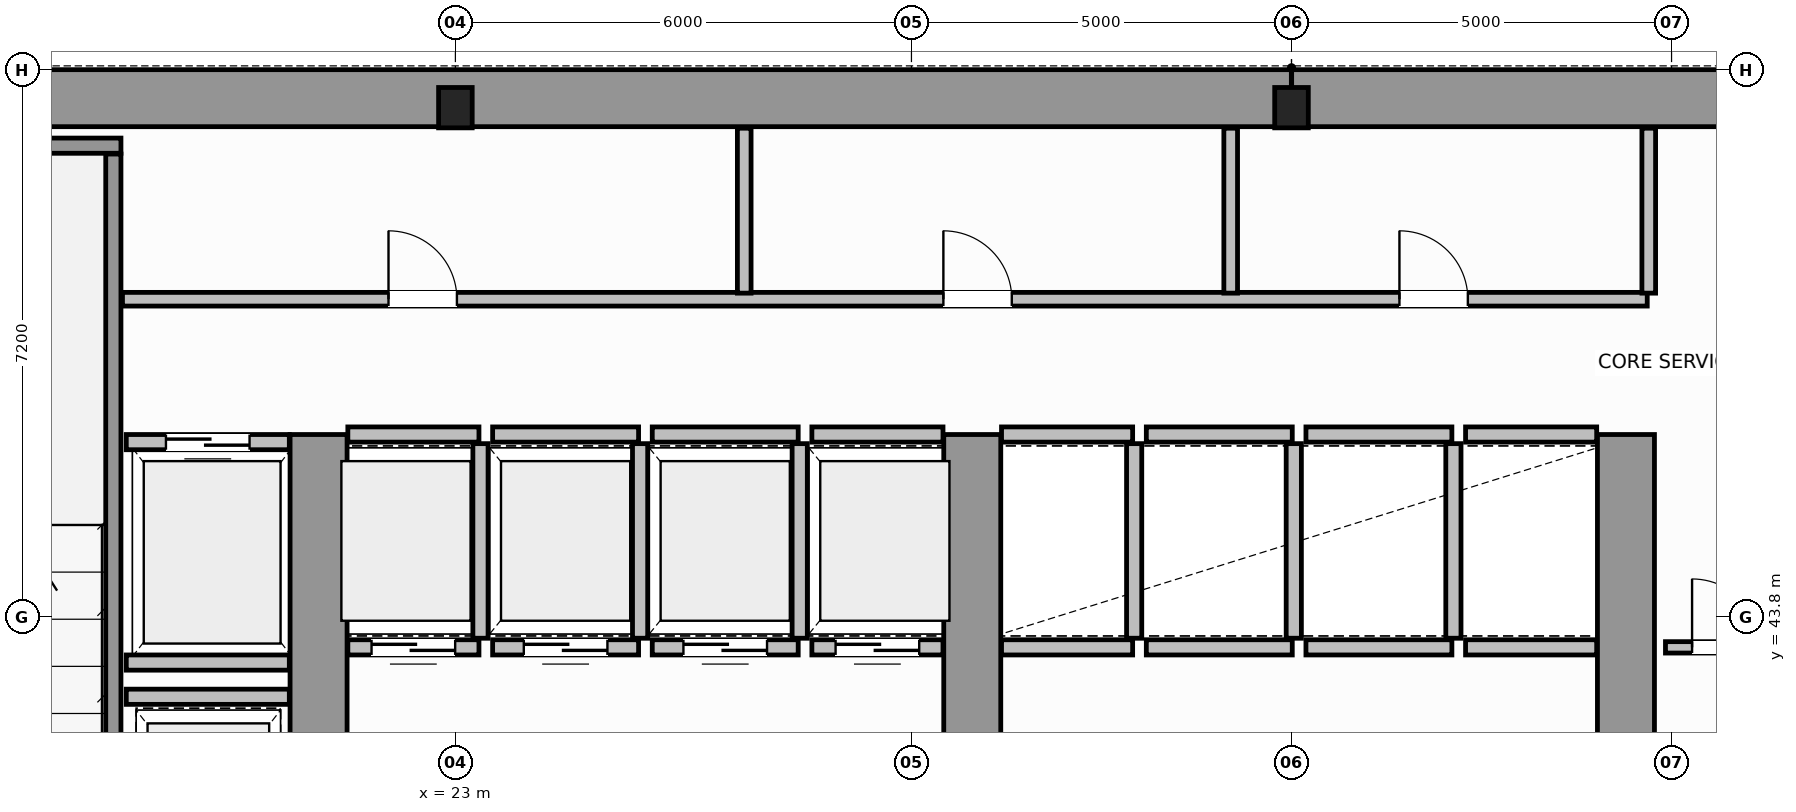
"""IFC4 building model, lengths in metres.
Left out: names, types, materials, properties, quantities, classifications, styles, units other than length and angle.
Written with IfcOpenShell. Run it as: python <this file> out.ifc"""

import sys

from ifc_helpers import new_model, si_unit, direction, frame, frame_2d, origin, origin_2d, place, context, subcontext, project, spatial, rectangle, i_section, extrude, source, transform, mapped, element, fill, save


model = new_model("IFC4")
c1 = context("Model", 3, precision=1e-05, world=origin(), true_north=direction((0.0, 1.0)))
c2 = subcontext(c1, "Body", "Model", "MODEL_VIEW")
j1 = project(units=[si_unit("LENGTHUNIT", "METRE"), si_unit("PLANEANGLEUNIT", "RADIAN")], contexts=[c1])
p1 = place(None, origin())
s1 = spatial("IfcSite", under=j1, at=p1, CompositionType="ELEMENT")
p2 = place(p1, origin())
s2 = spatial("IfcBuilding", under=s1, at=p2, CompositionType="ELEMENT")
p3 = place(p2, frame((0.0, 0.0, 88.2)))
s3 = spatial("IfcBuildingStorey", under=s2, at=p3, CompositionType="ELEMENT", Elevation=88.2)
m1 = source(origin(), c2, "Body", "SweptSolid", [
    extrude(i_section(OverallWidth=0.442, OverallDepth=0.531, WebThickness=0.065, FlangeThickness=0.076, FilletRadius=0.015, at=origin_2d()), origin(), (0.0, 0.0, 1.0), 3.8),
])
for number, where, z_axis, x_axis in (
    (1, (23.0, 50.5, 0.0), (0.0, 0.0, 1.0), (1.0, 0.0, 0.0)),
    (2, (34.0, 50.5, 0.0), (0.0, 0.0, 1.0), (1.0, 0.0, 0.0)),
):
    element("IfcColumn", number, at=place(p3, frame(where, z_axis=z_axis, x_axis=x_axis)), inside=s3, PredefinedType="COLUMN", context=c2, shape_type="MappedRepresentation", body=[
        mapped(m1, transform((0.0, 0.0, 0.0), scale=1.0)),
    ])
for number, where, z_axis, x_axis in (
    (3, (14.379, 50.625, 0.0), (0.0, 0.0, 1.0), (1.0, 0.0, 0.0)),
    (4, (34.002, 50.625, 0.0), (0.0, 0.0, 1.0), (1.0, 0.0, 0.0)),
):
    element("IfcWall", number, at=place(p3, frame(where, z_axis=z_axis, x_axis=x_axis)), inside=s3, PredefinedType="SHEAR", context=c2, shape_type="SweptSolid", body=[
        extrude(rectangle(XDim=19.619, YDim=0.75, at=frame_2d((9.81, 0.0))), origin(), (0.0, 0.0, 1.0), 3.8),
    ])
for number, where, z_axis, x_axis in (
    (5, (21.2, 36.895, 0.0), (0.0, 0.0, 1.0), (0.0, 1.0, 0.0)),
    (6, (29.8, 36.895, 0.0), (0.0, 0.0, 1.0), (0.0, 1.0, 0.0)),
    (7, (38.4, 36.895, 0.0), (0.0, 0.0, 1.0), (0.0, 1.0, 0.0)),
):
    element("IfcWall", number, at=place(p3, frame(where, z_axis=z_axis, x_axis=x_axis)), inside=s3, PredefinedType="SHEAR", context=c2, shape_type="SweptSolid", body=[
        extrude(rectangle(XDim=9.305, YDim=0.75, at=frame_2d((4.652, 0.0))), origin(), (0.0, 0.0, 1.0), 3.8),
    ])
p4 = place(p3, frame((14.375, 50.0, 0.0), z_axis=(0.0, 0.0, 1.0), x_axis=(1.0, 0.0, 0.0)))
e8 = element("IfcWall", 8, at=p4, inside=s3, PredefinedType="SOLIDWALL", context=c2, shape_type="SweptSolid", body=[
    extrude(rectangle(XDim=4.225, YDim=0.2, at=frame_2d((2.113, 0.0))), origin(), (0.0, 0.0, 1.0), 3.8),
])
p5 = place(p3, frame((18.5, 39.96, 0.0), z_axis=(0.0, 0.0, 1.0), x_axis=(0.0, 1.0, 0.0)))
e9 = element("IfcWall", 9, at=p5, inside=s3, PredefinedType="SOLIDWALL", context=c2, shape_type="SweptSolid", body=[
    extrude(rectangle(XDim=9.93, YDim=0.2, at=frame_2d((4.965, 0.0))), origin(), (0.0, 0.0, 1.0), 3.8),
])
p6 = place(p3, frame((21.585, 43.4, 0.0), z_axis=(0.0, 0.0, 1.0), x_axis=(1.0, 0.0, 0.0)))
e10 = element("IfcWall", 10, at=p6, inside=s3, PredefinedType="SOLIDWALL", context=c2, shape_type="SweptSolid", body=[
    extrude(rectangle(XDim=1.725, YDim=0.2, at=frame_2d((0.863, 0.0))), origin(), (0.0, 0.0, 1.0), 3.58),
])
p7 = place(p6, frame((0.312, 0.0, 0.0)))
e11 = element("IfcOpeningElement", 11, at=p7, cuts=e10, PredefinedType="OPENING", context=c2, shape_type="SweptSolid", body=[
    extrude(rectangle(XDim=1.1, YDim=2.15, at=frame_2d((0.55, 1.075))), frame((0.0, 0.11, 0.0), z_axis=(0.0, -1.0, 0.0), x_axis=(1.0, 0.0, 0.0)), (0.0, 0.0, 1.0), 0.22),
])
p8 = place(p3, frame((21.585, 46.2, 0.0), z_axis=(0.0, 0.0, 1.0), x_axis=(1.0, 0.0, 0.0)))
e12 = element("IfcWall", 12, at=p8, inside=s3, PredefinedType="SOLIDWALL", context=c2, shape_type="SweptSolid", body=[
    extrude(rectangle(XDim=1.725, YDim=0.2, at=frame_2d((0.863, 0.0))), origin(), (0.0, 0.0, 1.0), 3.58),
])
p9 = place(p3, frame((23.33, 43.52, 0.0), z_axis=(0.0, 0.0, 1.0), x_axis=(0.0, 1.0, 0.0)))
e13 = element("IfcWall", 13, at=p9, inside=s3, PredefinedType="SOLIDWALL", context=c2, shape_type="SweptSolid", body=[
    extrude(rectangle(XDim=2.56, YDim=0.2, at=frame_2d((1.28, 0.0))), origin(), (0.0, 0.0, 1.0), 3.58),
])
p10 = place(p3, frame((23.49, 43.4, 0.0), z_axis=(0.0, 0.0, 1.0), x_axis=(1.0, 0.0, 0.0)))
e14 = element("IfcWall", 14, at=p10, inside=s3, PredefinedType="SOLIDWALL", context=c2, shape_type="SweptSolid", body=[
    extrude(rectangle(XDim=1.92, YDim=0.2, at=frame_2d((0.96, 0.0))), origin(), (0.0, 0.0, 1.0), 3.58),
])
p11 = place(p10, frame((0.41, 0.0, 0.0)))
e15 = element("IfcOpeningElement", 15, at=p11, cuts=e14, PredefinedType="OPENING", context=c2, shape_type="SweptSolid", body=[
    extrude(rectangle(XDim=1.1, YDim=2.15, at=frame_2d((0.55, 1.075))), frame((0.0, 0.11, 0.0), z_axis=(0.0, -1.0, 0.0), x_axis=(1.0, 0.0, 0.0)), (0.0, 0.0, 1.0), 0.22),
])
p12 = place(p3, frame((23.49, 46.2, 0.0), z_axis=(0.0, 0.0, 1.0), x_axis=(1.0, 0.0, 0.0)))
e16 = element("IfcWall", 16, at=p12, inside=s3, PredefinedType="SOLIDWALL", context=c2, shape_type="SweptSolid", body=[
    extrude(rectangle(XDim=1.92, YDim=0.2, at=frame_2d((0.96, 0.0))), origin(), (0.0, 0.0, 1.0), 3.58),
])
p13 = place(p3, frame((25.43, 43.52, 0.0), z_axis=(0.0, 0.0, 1.0), x_axis=(0.0, 1.0, 0.0)))
e17 = element("IfcWall", 17, at=p13, inside=s3, PredefinedType="SOLIDWALL", context=c2, shape_type="SweptSolid", body=[
    extrude(rectangle(XDim=2.56, YDim=0.2, at=frame_2d((1.28, 0.0))), origin(), (0.0, 0.0, 1.0), 3.58),
])
p14 = place(p3, frame((25.59, 43.4, 0.0), z_axis=(0.0, 0.0, 1.0), x_axis=(1.0, 0.0, 0.0)))
e18 = element("IfcWall", 18, at=p14, inside=s3, PredefinedType="SOLIDWALL", context=c2, shape_type="SweptSolid", body=[
    extrude(rectangle(XDim=1.92, YDim=0.2, at=frame_2d((0.96, 0.0))), origin(), (0.0, 0.0, 1.0), 3.58),
])
p15 = place(p14, frame((0.41, 0.0, 0.0)))
e19 = element("IfcOpeningElement", 19, at=p15, cuts=e18, PredefinedType="OPENING", context=c2, shape_type="SweptSolid", body=[
    extrude(rectangle(XDim=1.1, YDim=2.15, at=frame_2d((0.55, 1.075))), frame((0.0, 0.11, 0.0), z_axis=(0.0, -1.0, 0.0), x_axis=(1.0, 0.0, 0.0)), (0.0, 0.0, 1.0), 0.22),
])
p16 = place(p3, frame((25.59, 46.2, 0.0), z_axis=(0.0, 0.0, 1.0), x_axis=(1.0, 0.0, 0.0)))
e20 = element("IfcWall", 20, at=p16, inside=s3, PredefinedType="SOLIDWALL", context=c2, shape_type="SweptSolid", body=[
    extrude(rectangle(XDim=1.92, YDim=0.2, at=frame_2d((0.96, 0.0))), origin(), (0.0, 0.0, 1.0), 3.58),
])
p17 = place(p3, frame((27.53, 43.52, 0.0), z_axis=(0.0, 0.0, 1.0), x_axis=(0.0, 1.0, 0.0)))
e21 = element("IfcWall", 21, at=p17, inside=s3, PredefinedType="SOLIDWALL", context=c2, shape_type="SweptSolid", body=[
    extrude(rectangle(XDim=2.56, YDim=0.2, at=frame_2d((1.28, 0.0))), origin(), (0.0, 0.0, 1.0), 3.58),
])
p18 = place(p3, frame((27.69, 43.4, 0.0), z_axis=(0.0, 0.0, 1.0), x_axis=(1.0, 0.0, 0.0)))
e22 = element("IfcWall", 22, at=p18, inside=s3, PredefinedType="SOLIDWALL", context=c2, shape_type="SweptSolid", body=[
    extrude(rectangle(XDim=1.725, YDim=0.2, at=frame_2d((0.863, 0.0))), origin(), (0.0, 0.0, 1.0), 3.58),
])
p19 = place(p18, frame((0.312, 0.0, 0.0)))
e23 = element("IfcOpeningElement", 23, at=p19, cuts=e22, PredefinedType="OPENING", context=c2, shape_type="SweptSolid", body=[
    extrude(rectangle(XDim=1.1, YDim=2.15, at=frame_2d((0.55, 1.075))), frame((0.0, 0.11, 0.0), z_axis=(0.0, -1.0, 0.0), x_axis=(1.0, 0.0, 0.0)), (0.0, 0.0, 1.0), 0.22),
])
p20 = place(p3, frame((27.69, 46.2, 0.0), z_axis=(0.0, 0.0, 1.0), x_axis=(1.0, 0.0, 0.0)))
e24 = element("IfcWall", 24, at=p20, inside=s3, PredefinedType="SOLIDWALL", context=c2, shape_type="SweptSolid", body=[
    extrude(rectangle(XDim=1.725, YDim=0.2, at=frame_2d((0.863, 0.0))), origin(), (0.0, 0.0, 1.0), 3.58),
])
for number, where, z_axis, x_axis in (
    (25, (30.185, 43.4, 0.0), (0.0, 0.0, 1.0), (1.0, 0.0, 0.0)),
    (26, (30.185, 46.2, 0.0), (0.0, 0.0, 1.0), (1.0, 0.0, 0.0)),
):
    element("IfcWall", number, at=place(p3, frame(where, z_axis=z_axis, x_axis=x_axis)), inside=s3, PredefinedType="SOLIDWALL", context=c2, shape_type="SweptSolid", body=[
        extrude(rectangle(XDim=1.725, YDim=0.2, at=frame_2d((0.862, 0.0))), origin(), (0.0, 0.0, 1.0), 3.58),
    ])
p21 = place(p3, frame((31.93, 43.52, 0.0), z_axis=(0.0, 0.0, 1.0), x_axis=(0.0, 1.0, 0.0)))
e27 = element("IfcWall", 27, at=p21, inside=s3, PredefinedType="SOLIDWALL", context=c2, shape_type="SweptSolid", body=[
    extrude(rectangle(XDim=2.56, YDim=0.2, at=frame_2d((1.28, 0.0))), origin(), (0.0, 0.0, 1.0), 3.58),
])
for number, where, z_axis, x_axis in (
    (28, (32.09, 43.4, 0.0), (0.0, 0.0, 1.0), (1.0, 0.0, 0.0)),
    (29, (32.09, 46.2, 0.0), (0.0, 0.0, 1.0), (1.0, 0.0, 0.0)),
):
    element("IfcWall", number, at=place(p3, frame(where, z_axis=z_axis, x_axis=x_axis)), inside=s3, PredefinedType="SOLIDWALL", context=c2, shape_type="SweptSolid", body=[
        extrude(rectangle(XDim=1.92, YDim=0.2, at=frame_2d((0.96, 0.0))), origin(), (0.0, 0.0, 1.0), 3.58),
    ])
p22 = place(p3, frame((34.03, 43.52, 0.0), z_axis=(0.0, 0.0, 1.0), x_axis=(0.0, 1.0, 0.0)))
e30 = element("IfcWall", 30, at=p22, inside=s3, PredefinedType="SOLIDWALL", context=c2, shape_type="SweptSolid", body=[
    extrude(rectangle(XDim=2.56, YDim=0.2, at=frame_2d((1.28, 0.0))), origin(), (0.0, 0.0, 1.0), 3.58),
])
for number, where, z_axis, x_axis in (
    (31, (34.19, 43.4, 0.0), (0.0, 0.0, 1.0), (1.0, 0.0, 0.0)),
    (32, (34.19, 46.2, 0.0), (0.0, 0.0, 1.0), (1.0, 0.0, 0.0)),
):
    element("IfcWall", number, at=place(p3, frame(where, z_axis=z_axis, x_axis=x_axis)), inside=s3, PredefinedType="SOLIDWALL", context=c2, shape_type="SweptSolid", body=[
        extrude(rectangle(XDim=1.92, YDim=0.2, at=frame_2d((0.96, 0.0))), origin(), (0.0, 0.0, 1.0), 3.58),
    ])
p23 = place(p3, frame((36.13, 43.52, 0.0), z_axis=(0.0, 0.0, 1.0), x_axis=(0.0, 1.0, 0.0)))
e33 = element("IfcWall", 33, at=p23, inside=s3, PredefinedType="SOLIDWALL", context=c2, shape_type="SweptSolid", body=[
    extrude(rectangle(XDim=2.56, YDim=0.2, at=frame_2d((1.28, 0.0))), origin(), (0.0, 0.0, 1.0), 3.58),
])
for number, where, z_axis, x_axis in (
    (34, (36.29, 43.4, 0.0), (0.0, 0.0, 1.0), (1.0, 0.0, 0.0)),
    (35, (36.29, 46.2, 0.0), (0.0, 0.0, 1.0), (1.0, 0.0, 0.0)),
):
    element("IfcWall", number, at=place(p3, frame(where, z_axis=z_axis, x_axis=x_axis)), inside=s3, PredefinedType="SOLIDWALL", context=c2, shape_type="SweptSolid", body=[
        extrude(rectangle(XDim=1.725, YDim=0.2, at=frame_2d((0.862, 0.0))), origin(), (0.0, 0.0, 1.0), 3.58),
    ])
p24 = place(p3, frame((18.67, 46.1, 0.0), z_axis=(0.0, 0.0, 1.0), x_axis=(1.0, 0.0, 0.0)))
e36 = element("IfcWall", 36, at=p24, inside=s3, PredefinedType="SOLIDWALL", context=c2, shape_type="SweptSolid", body=[
    extrude(rectangle(XDim=2.145, YDim=0.2, at=frame_2d((1.073, 0.0))), origin(), (0.0, 0.0, 1.0), 3.58),
])
p25 = place(p24, frame((0.522, 0.0, 0.0)))
e37 = element("IfcOpeningElement", 37, at=p25, cuts=e36, PredefinedType="OPENING", context=c2, shape_type="SweptSolid", body=[
    extrude(rectangle(XDim=1.1, YDim=2.15, at=frame_2d((0.55, 1.075))), frame((0.0, 0.11, 0.0), z_axis=(0.0, -1.0, 0.0), x_axis=(1.0, 0.0, 0.0)), (0.0, 0.0, 1.0), 0.22),
])
for number, where, z_axis, x_axis in (
    (38, (18.67, 43.2, 0.0), (0.0, 0.0, 1.0), (1.0, 0.0, 0.0)),
    (39, (18.67, 42.75, 0.0), (0.0, 0.0, 1.0), (1.0, 0.0, 0.0)),
):
    element("IfcWall", number, at=place(p3, frame(where, z_axis=z_axis, x_axis=x_axis)), inside=s3, PredefinedType="SOLIDWALL", context=c2, shape_type="SweptSolid", body=[
        extrude(rectangle(XDim=2.145, YDim=0.2, at=frame_2d((1.073, 0.0))), origin(), (0.0, 0.0, 1.0), 3.58),
    ])
p26 = place(p3, frame((38.92, 43.4, 0.0), z_axis=(0.0, 0.0, 1.0), x_axis=(1.0, 0.0, 0.0)))
e40 = element("IfcWall", 40, at=p26, inside=s3, PredefinedType="PARTITIONING", context=c2, shape_type="SweptSolid", body=[
    extrude(rectangle(XDim=1.6, YDim=0.15, at=frame_2d((0.8, 0.0))), origin(), (0.0, 0.0, 1.0), 3.58),
])
p27 = place(p26, frame((0.35, 0.0, 0.0)))
e41 = element("IfcOpeningElement", 41, at=p27, cuts=e40, PredefinedType="OPENING", context=c2, shape_type="SweptSolid", body=[
    extrude(rectangle(XDim=0.9, YDim=2.1, at=frame_2d((0.45, 1.05))), frame((0.0, 0.085, 0.0), z_axis=(0.0, -1.0, 0.0), x_axis=(1.0, 0.0, 0.0)), (0.0, 0.0, 1.0), 0.17),
])
p28 = place(p3, frame((18.62, 47.98, 0.0), z_axis=(0.0, 0.0, 1.0), x_axis=(1.0, 0.0, 0.0)))
e42 = element("IfcWall", 42, at=p28, inside=s3, PredefinedType="PLUMBINGWALL", context=c2, shape_type="SweptSolid", body=[
    extrude(rectangle(XDim=20.06, YDim=0.18, at=frame_2d((10.03, 0.0))), origin(), (0.0, 0.0, 1.0), 3.58),
])
p29 = place(p28, frame((3.5, 0.0, 0.0)))
e43 = element("IfcOpeningElement", 43, at=p29, cuts=e42, PredefinedType="OPENING", context=c2, shape_type="SweptSolid", body=[
    extrude(rectangle(XDim=0.9, YDim=2.15, at=frame_2d((0.45, 1.075))), frame((0.0, 0.1, 0.0), z_axis=(0.0, -1.0, 0.0), x_axis=(1.0, 0.0, 0.0)), (0.0, 0.0, 1.0), 0.2),
])
p30 = place(p28, frame((10.8, 0.0, 0.0)))
e44 = element("IfcOpeningElement", 44, at=p30, cuts=e42, PredefinedType="OPENING", context=c2, shape_type="SweptSolid", body=[
    extrude(rectangle(XDim=0.9, YDim=2.15, at=frame_2d((0.45, 1.075))), frame((0.0, 0.1, 0.0), z_axis=(0.0, -1.0, 0.0), x_axis=(1.0, 0.0, 0.0)), (0.0, 0.0, 1.0), 0.2),
])
p31 = place(p28, frame((16.8, 0.0, 0.0)))
e45 = element("IfcOpeningElement", 45, at=p31, cuts=e42, PredefinedType="OPENING", context=c2, shape_type="SweptSolid", body=[
    extrude(rectangle(XDim=0.9, YDim=2.15, at=frame_2d((0.45, 1.075))), frame((0.0, 0.1, 0.0), z_axis=(0.0, -1.0, 0.0), x_axis=(1.0, 0.0, 0.0)), (0.0, 0.0, 1.0), 0.2),
])
for number, where, z_axis, x_axis in (
    (46, (26.8, 48.06, 0.0), (0.0, 0.0, 1.0), (0.0, 1.0, 0.0)),
    (47, (33.2, 48.06, 0.0), (0.0, 0.0, 1.0), (0.0, 1.0, 0.0)),
    (48, (38.7, 48.06, 0.0), (0.0, 0.0, 1.0), (0.0, 1.0, 0.0)),
):
    element("IfcWall", number, at=place(p3, frame(where, z_axis=z_axis, x_axis=x_axis)), inside=s3, PredefinedType="PLUMBINGWALL", context=c2, shape_type="SweptSolid", body=[
        extrude(rectangle(XDim=2.17, YDim=0.18, at=frame_2d((1.085, 0.0))), origin(), (0.0, 0.0, 1.0), 3.58),
    ])
m2 = source(origin(), c2, "Body", "SweptSolid", [
    extrude(rectangle(XDim=1.1, YDim=2.15, at=frame_2d((0.55, 1.075))), frame((0.0, 0.025, 0.0), z_axis=(0.0, -1.0, 0.0), x_axis=(1.0, 0.0, 0.0)), (0.0, 0.0, 1.0), 0.05),
])
p32 = place(p7, origin())
e49 = element("IfcDoor", 49, at=p32, inside=s3, OperationType="DOUBLE_DOOR_SLIDING", PredefinedType="DOOR", context=c2, shape_type="MappedRepresentation", body=[
    mapped(m2, transform((0.0, 0.0, 0.0), scale=1.0)),
])
fill(e11, e49)
p33 = place(p11, origin())
e50 = element("IfcDoor", 50, at=p33, inside=s3, OperationType="DOUBLE_DOOR_SLIDING", PredefinedType="DOOR", context=c2, shape_type="MappedRepresentation", body=[
    mapped(m2, transform((0.0, 0.0, 0.0), scale=1.0)),
])
fill(e15, e50)
p34 = place(p15, origin())
e51 = element("IfcDoor", 51, at=p34, inside=s3, OperationType="DOUBLE_DOOR_SLIDING", PredefinedType="DOOR", context=c2, shape_type="MappedRepresentation", body=[
    mapped(m2, transform((0.0, 0.0, 0.0), scale=1.0)),
])
fill(e19, e51)
p35 = place(p19, origin())
e52 = element("IfcDoor", 52, at=p35, inside=s3, OperationType="DOUBLE_DOOR_SLIDING", PredefinedType="DOOR", context=c2, shape_type="MappedRepresentation", body=[
    mapped(m2, transform((0.0, 0.0, 0.0), scale=1.0)),
])
fill(e23, e52)
p36 = place(p25, origin())
e53 = element("IfcDoor", 53, at=p36, inside=s3, OperationType="DOUBLE_DOOR_SLIDING", PredefinedType="DOOR", context=c2, shape_type="MappedRepresentation", body=[
    mapped(m2, transform((0.0, 0.0, 0.0), scale=1.0)),
])
fill(e37, e53)
m3 = source(origin(), c2, "Body", "SweptSolid", [
    extrude(rectangle(XDim=0.9, YDim=2.1, at=frame_2d((0.45, 1.05))), frame((0.0, 0.025, 0.0), z_axis=(0.0, -1.0, 0.0), x_axis=(1.0, 0.0, 0.0)), (0.0, 0.0, 1.0), 0.05),
])
p37 = place(p27, origin())
e54 = element("IfcDoor", 54, at=p37, inside=s3, OperationType="SINGLE_SWING_LEFT", PredefinedType="DOOR", context=c2, shape_type="MappedRepresentation", body=[
    mapped(m3, transform((0.0, 0.0, 0.0), scale=1.0)),
])
fill(e41, e54)
m4 = source(origin(), c2, "Body", "SweptSolid", [
    extrude(rectangle(XDim=0.9, YDim=2.15, at=frame_2d((0.45, 1.075))), frame((0.0, 0.025, 0.0), z_axis=(0.0, -1.0, 0.0), x_axis=(1.0, 0.0, 0.0)), (0.0, 0.0, 1.0), 0.05),
])
p38 = place(p29, origin())
e55 = element("IfcDoor", 55, at=p38, inside=s3, OperationType="SINGLE_SWING_LEFT", PredefinedType="DOOR", context=c2, shape_type="MappedRepresentation", body=[
    mapped(m4, transform((0.0, 0.0, 0.0), scale=1.0)),
])
fill(e43, e55)
p39 = place(p30, origin())
e56 = element("IfcDoor", 56, at=p39, inside=s3, OperationType="SINGLE_SWING_RIGHT", PredefinedType="DOOR", context=c2, shape_type="MappedRepresentation", body=[
    mapped(m4, transform((0.0, 0.0, 0.0), scale=1.0)),
])
fill(e44, e56)
p40 = place(p31, origin())
e57 = element("IfcDoor", 57, at=p40, inside=s3, OperationType="SINGLE_SWING_LEFT", PredefinedType="DOOR", context=c2, shape_type="MappedRepresentation", body=[
    mapped(m4, transform((0.0, 0.0, 0.0), scale=1.0)),
])
fill(e45, e57)
save(model, sys.argv[1])
